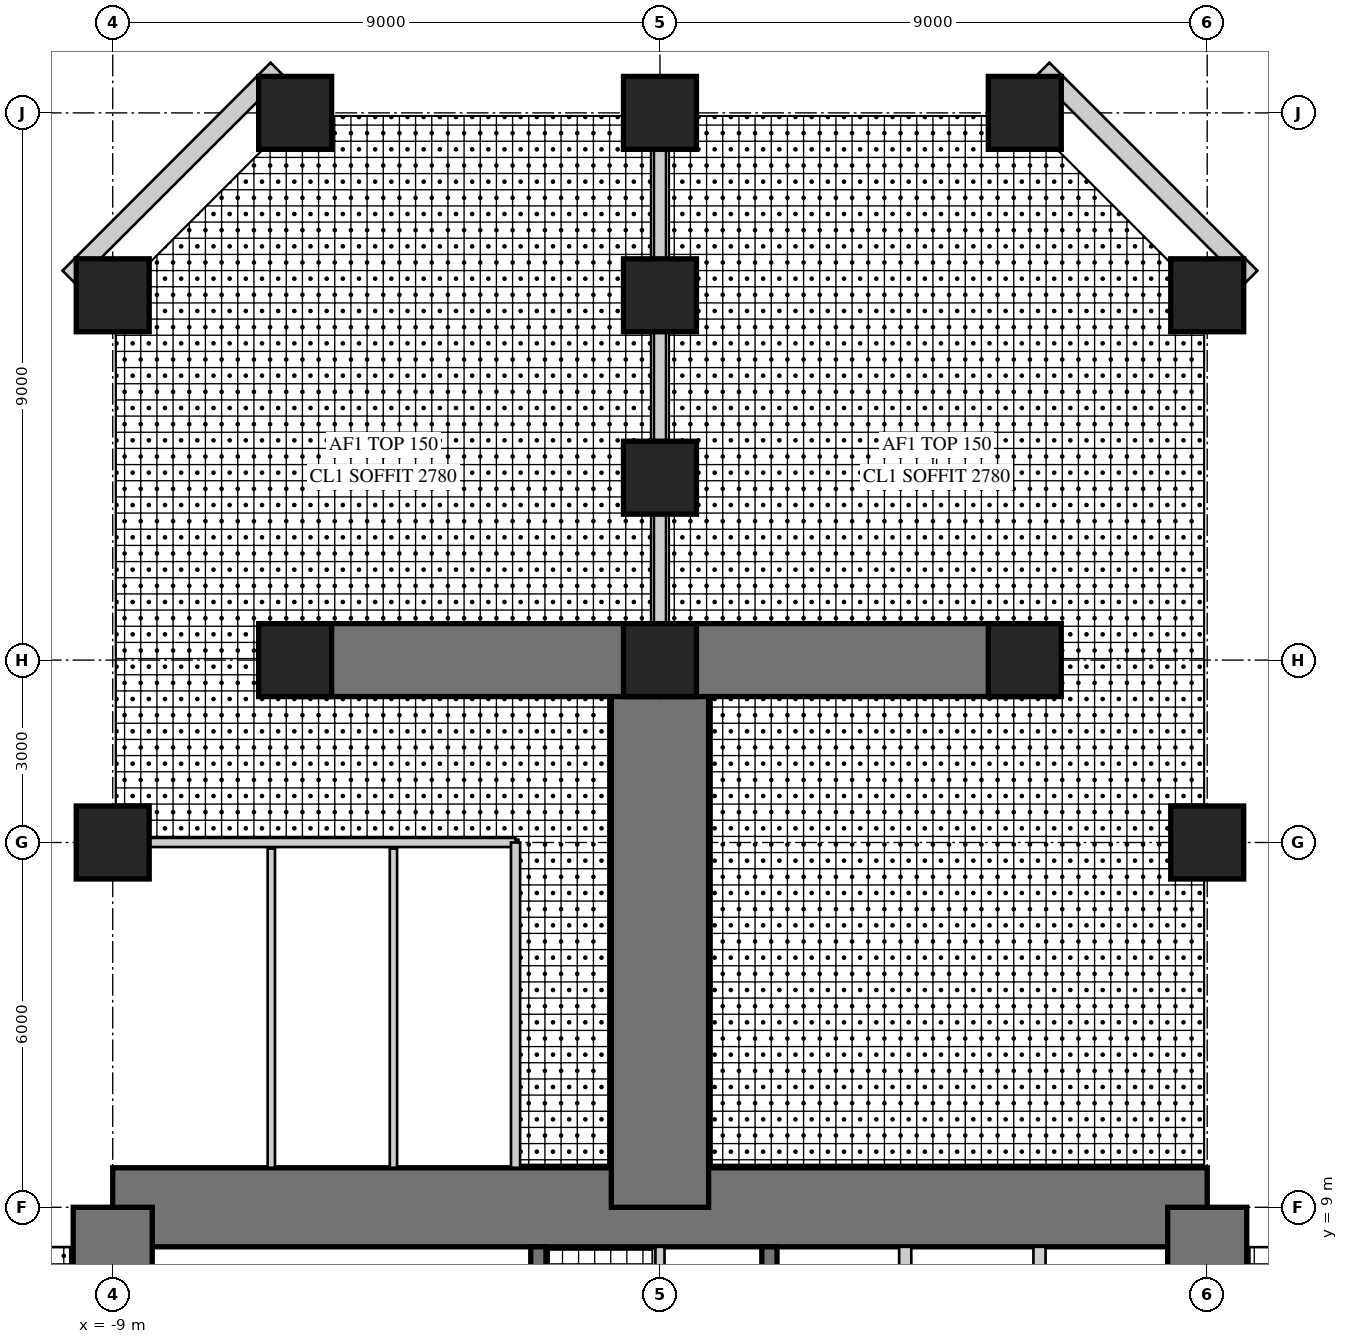
"""IFC4 building model, lengths in metres.
Left out: names, types, materials, properties, quantities, classifications, styles, units other than length and angle.
Written with IfcOpenShell. Run it as: python <this file> out.ifc"""

import sys

from ifc_helpers import new_model, si_unit, direction, frame, frame_2d, origin, origin_2d, place, context, subcontext, project, spatial, rectangle, hollow_rectangle, extrude, element, fill, save


model = new_model("IFC4")
c1 = context("Model", 3, precision=1e-05, world=origin(), true_north=direction((0.0, 1.0)))
c2 = subcontext(c1, "Body", "Model", "MODEL_VIEW")
j1 = project(units=[si_unit("LENGTHUNIT", "METRE"), si_unit("PLANEANGLEUNIT", "RADIAN")], contexts=[c1])
p1 = place(None, origin())
s1 = spatial("IfcSite", under=j1, at=p1, CompositionType="ELEMENT")
p2 = place(p1, origin())
s2 = spatial("IfcBuilding", under=s1, at=p2, CompositionType="ELEMENT")
p3 = place(p2, frame((0.0, 0.0, 59.5)))
s3 = spatial("IfcBuildingStorey", under=s2, at=p3, CompositionType="ELEMENT", Elevation=59.5)
p4 = place(p3, frame((9.0, 9.0, 0.0), z_axis=(0.0, 0.0, 1.0), x_axis=(-1.0, 0.0, 0.0)))
e1 = element("IfcWall", 1, at=p4, inside=s3, PredefinedType="SHEAR", context=c2, shape_type="SweptSolid", body=[
    extrude(rectangle(XDim=18.0, YDim=1.3, at=frame_2d((9.0, 0.0))), origin(), (0.0, 0.0, 1.0), 4.0),
])
p5 = place(p4, frame((9.8, 0.0, 0.0)))
e2 = element("IfcOpeningElement", 2, at=p5, cuts=e1, PredefinedType="OPENING", context=c2, shape_type="SweptSolid", body=[
    extrude(rectangle(XDim=1.0, YDim=2.4, at=frame_2d((0.5, 1.2))), frame((0.0, 0.66, 0.0), z_axis=(0.0, -1.0, 0.0), x_axis=(1.0, 0.0, 0.0)), (0.0, 0.0, 1.0), 1.32),
])
p6 = place(p3, frame((9.0, -9.0, 0.0), z_axis=(0.0, 0.0, 1.0), x_axis=(0.0, 1.0, 0.0)))
e3 = element("IfcWall", 3, at=p6, inside=s3, PredefinedType="SHEAR", context=c2, shape_type="SweptSolid", body=[
    extrude(rectangle(XDim=18.0, YDim=1.3, at=frame_2d((9.0, 0.0))), origin(), (0.0, 0.0, 1.0), 4.0),
])
p7 = place(p6, frame((9.8, 0.0, 0.0)))
e4 = element("IfcOpeningElement", 4, at=p7, cuts=e3, PredefinedType="OPENING", context=c2, shape_type="SweptSolid", body=[
    extrude(rectangle(XDim=1.0, YDim=2.4, at=frame_2d((0.5, 1.2))), frame((0.0, 0.66, 0.0), z_axis=(0.0, -1.0, 0.0), x_axis=(1.0, 0.0, 0.0)), (0.0, 0.0, 1.0), 1.32),
])
p8 = place(p3, frame((-9.0, 9.0, 0.0), z_axis=(0.0, 0.0, 1.0), x_axis=(0.0, -1.0, 0.0)))
e5 = element("IfcWall", 5, at=p8, inside=s3, PredefinedType="SHEAR", context=c2, shape_type="SweptSolid", body=[
    extrude(rectangle(XDim=18.0, YDim=1.3, at=frame_2d((9.0, 0.0))), origin(), (0.0, 0.0, 1.0), 4.0),
])
p9 = place(p8, frame((9.8, 0.0, 0.0)))
e6 = element("IfcOpeningElement", 6, at=p9, cuts=e5, PredefinedType="OPENING", context=c2, shape_type="SweptSolid", body=[
    extrude(rectangle(XDim=1.0, YDim=2.4, at=frame_2d((0.5, 1.2))), frame((0.0, 0.66, 0.0), z_axis=(0.0, -1.0, 0.0), x_axis=(1.0, 0.0, 0.0)), (0.0, 0.0, 1.0), 1.32),
])
p10 = place(p3, frame((1.8, 1.875, 0.0), z_axis=(0.0, 0.0, 1.0), x_axis=(0.0, 1.0, 0.0)))
e7 = element("IfcWall", 7, at=p10, inside=s3, PredefinedType="SHEAR", context=c2, shape_type="SweptSolid", body=[
    extrude(rectangle(XDim=6.475, YDim=0.25, at=frame_2d((3.238, 0.0))), origin(), (0.0, 0.0, 1.0), 4.0),
])
p11 = place(p10, frame((1.875, 0.0, 0.0)))
e8 = element("IfcOpeningElement", 8, at=p11, cuts=e7, PredefinedType="OPENING", context=c2, shape_type="SweptSolid", body=[
    extrude(rectangle(XDim=1.6, YDim=2.4, at=frame_2d((0.8, 1.2))), frame((0.0, 0.135, 0.0), z_axis=(0.0, -1.0, 0.0), x_axis=(1.0, 0.0, 0.0)), (0.0, 0.0, 1.0), 0.27),
])
for number, where, z_axis, x_axis in (
    (9, (4.033, 5.975, 0.0), (0.0, 0.0, 1.0), (0.0, 1.0, 0.0)),
    (10, (6.242, 5.975, 0.0), (0.0, 0.0, 1.0), (0.0, 1.0, 0.0)),
):
    element("IfcWall", number, at=place(p3, frame(where, z_axis=z_axis, x_axis=x_axis)), inside=s3, PredefinedType="PARTITIONING", context=c2, shape_type="SweptSolid", body=[
        extrude(rectangle(XDim=2.375, YDim=0.2, at=frame_2d((1.188, 0.0))), origin(), (0.0, 0.0, 1.0), 4.0),
    ])
p12 = place(p3, frame((-2.0, 1.675, 0.0), z_axis=(0.0, 0.0, 1.0), x_axis=(0.0, 1.0, 0.0)))
e11 = element("IfcWall", 11, at=p12, inside=s3, PredefinedType="SHEAR", context=c2, shape_type="SweptSolid", body=[
    extrude(rectangle(XDim=6.675, YDim=0.25, at=frame_2d((3.337, 0.0))), origin(), (0.0, 0.0, 1.0), 4.0),
])
p13 = place(p12, frame((0.725, 0.0, 0.0)))
e12 = element("IfcOpeningElement", 12, at=p13, cuts=e11, PredefinedType="OPENING", context=c2, shape_type="SweptSolid", body=[
    extrude(rectangle(XDim=1.0, YDim=2.1, at=frame_2d((0.5, 1.05))), frame((0.0, 0.135, 0.0), z_axis=(0.0, -1.0, 0.0), x_axis=(1.0, 0.0, 0.0)), (0.0, 0.0, 1.0), 0.27),
])
p14 = place(p3, frame((0.0, 9.0, 0.0), z_axis=(0.0, 0.0, 1.0), x_axis=(0.0, 1.0, 0.0)))
e13 = element("IfcWall", 13, at=p14, inside=s3, PredefinedType="SHEAR", context=c2, shape_type="SweptSolid", body=[
    extrude(rectangle(XDim=9.0, YDim=1.6, at=frame_2d((4.5, 0.0))), origin(), (0.0, 0.0, 1.0), 4.0),
])
for number, where, z_axis, x_axis in (
    (14, (0.0, 18.0, 0.0), (0.0, 0.0, 1.0), (-1.0, 0.0, 0.0)),
    (15, (0.0, 18.0, 0.0), (0.0, 0.0, 1.0), (1.0, 0.0, 0.0)),
):
    element("IfcWall", number, at=place(p3, frame(where, z_axis=z_axis, x_axis=x_axis)), inside=s3, PredefinedType="SHEAR", context=c2, shape_type="SweptSolid", body=[
        extrude(rectangle(XDim=6.0, YDim=1.2, at=frame_2d((3.0, 0.0))), origin(), (0.0, 0.0, 1.0), 4.0),
    ])
for number, where, z_axis, x_axis in (
    (16, (9.0, 15.0, 0.0), (0.0, 0.0, 1.0), (1.0, 0.0, 0.0)),
    (17, (9.0, 24.0, 0.0), (0.0, 0.0, 1.0), (1.0, 0.0, 0.0)),
    (18, (-9.0, 15.0, 0.0), (0.0, 0.0, 1.0), (1.0, 0.0, 0.0)),
    (19, (-9.0, 24.0, 0.0), (0.0, 0.0, 1.0), (1.0, 0.0, 0.0)),
    (20, (6.0, 27.0, 0.0), (0.0, 0.0, 1.0), (1.0, 0.0, 0.0)),
    (21, (0.0, 27.0, 0.0), (0.0, 0.0, 1.0), (1.0, 0.0, 0.0)),
    (22, (-6.0, 27.0, 0.0), (0.0, 0.0, 1.0), (1.0, 0.0, 0.0)),
    (23, (6.0, 18.0, 0.0), (0.0, 0.0, 1.0), (1.0, 0.0, 0.0)),
    (24, (0.0, 18.0, 0.0), (0.0, 0.0, 1.0), (1.0, 0.0, 0.0)),
    (25, (-6.0, 18.0, 0.0), (0.0, 0.0, 1.0), (1.0, 0.0, 0.0)),
    (26, (0.0, 21.0, 0.0), (0.0, 0.0, 1.0), (1.0, 0.0, 0.0)),
    (27, (0.0, 24.0, 0.0), (0.0, 0.0, 1.0), (1.0, 0.0, 0.0)),
):
    element("IfcColumn", number, at=place(p3, frame(where, z_axis=z_axis, x_axis=x_axis)), inside=s3, PredefinedType="COLUMN", context=c2, shape_type="SweptSolid", body=[
        extrude(rectangle(XDim=1.2, YDim=1.2, at=origin_2d()), origin(), (0.0, 0.0, 1.0), 4.0),
    ])
p15 = place(p3, frame((9.72, 24.298, 0.0), z_axis=(0.0, 0.0, 1.0), x_axis=(-0.707106781187, 0.707106781187, 0.0)))
e28 = element("IfcWall", 28, at=p15, inside=s3, PredefinedType="SOLIDWALL", context=c2, shape_type="SweptSolid", body=[
    extrude(rectangle(XDim=4.839, YDim=0.3, at=frame_2d((2.419, 0.0))), origin(), (0.0, 0.0, 1.0), 3.8),
])
p16 = place(p15, frame((1.969, 0.0, 0.3)))
e29 = element("IfcOpeningElement", 29, at=p16, cuts=e28, PredefinedType="OPENING", context=c2, shape_type="SweptSolid", body=[
    extrude(rectangle(XDim=0.9, YDim=2.4, at=frame_2d((0.45, 1.2))), frame((0.0, 0.16, 0.0), z_axis=(0.0, -1.0, 0.0), x_axis=(1.0, 0.0, 0.0)), (0.0, 0.0, 1.0), 0.32),
])
p17 = place(p3, frame((-6.298, 27.72, 0.0), z_axis=(0.0, 0.0, 1.0), x_axis=(-0.707106781187, -0.707106781187, 0.0)))
e30 = element("IfcWall", 30, at=p17, inside=s3, PredefinedType="SOLIDWALL", context=c2, shape_type="SweptSolid", body=[
    extrude(rectangle(XDim=4.839, YDim=0.3, at=frame_2d((2.419, 0.0))), origin(), (0.0, 0.0, 1.0), 3.8),
])
p18 = place(p17, frame((1.969, 0.0, 0.3)))
e31 = element("IfcOpeningElement", 31, at=p18, cuts=e30, PredefinedType="OPENING", context=c2, shape_type="SweptSolid", body=[
    extrude(rectangle(XDim=0.9, YDim=2.4, at=frame_2d((0.45, 1.2))), frame((0.0, 0.16, 0.0), z_axis=(0.0, -1.0, 0.0), x_axis=(1.0, 0.0, 0.0)), (0.0, 0.0, 1.0), 0.32),
])
p19 = place(p3, frame((0.0, 5.675, 0.0), z_axis=(0.0, 0.0, 1.0), x_axis=(0.0, 1.0, 0.0)))
e32 = element("IfcWall", 32, at=p19, inside=s3, PredefinedType="PARTITIONING", context=c2, shape_type="SweptSolid", body=[
    extrude(rectangle(XDim=2.675, YDim=0.15, at=frame_2d((1.337, 0.0))), origin(), (0.0, 0.0, 1.0), 3.8),
])
p20 = place(p19, frame((0.4, 0.0, 0.0)))
e33 = element("IfcOpeningElement", 33, at=p20, cuts=e32, PredefinedType="OPENING", context=c2, shape_type="SweptSolid", body=[
    extrude(rectangle(XDim=1.0, YDim=2.1, at=frame_2d((0.5, 1.05))), frame((0.0, 0.085, 0.0), z_axis=(0.0, -1.0, 0.0), x_axis=(1.0, 0.0, 0.0)), (0.0, 0.0, 1.0), 0.17),
])
p21 = place(p3, frame((-2.375, 15.0, 0.0), z_axis=(0.0, 0.0, 1.0), x_axis=(-1.0, 0.0, 0.0)))
e34 = element("IfcWall", 34, at=p21, inside=s3, PredefinedType="PARTITIONING", context=c2, shape_type="SweptSolid", body=[
    extrude(rectangle(XDim=6.025, YDim=0.15, at=frame_2d((3.012, 0.0))), origin(), (0.0, 0.0, 1.0), 2.95),
])
p22 = place(p21, frame((0.504, 0.0, 0.0)))
e35 = element("IfcOpeningElement", 35, at=p22, cuts=e34, PredefinedType="OPENING", context=c2, shape_type="SweptSolid", body=[
    extrude(rectangle(XDim=1.0, YDim=2.1, at=frame_2d((0.5, 1.05))), frame((0.0, 0.085, 0.0), z_axis=(0.0, -1.0, 0.0), x_axis=(1.0, 0.0, 0.0)), (0.0, 0.0, 1.0), 0.17),
])
p23 = place(p21, frame((2.512, 0.0, 0.0)))
e36 = element("IfcOpeningElement", 36, at=p23, cuts=e34, PredefinedType="OPENING", context=c2, shape_type="SweptSolid", body=[
    extrude(rectangle(XDim=1.0, YDim=2.1, at=frame_2d((0.5, 1.05))), frame((0.0, 0.085, 0.0), z_axis=(0.0, -1.0, 0.0), x_axis=(1.0, 0.0, 0.0)), (0.0, 0.0, 1.0), 0.17),
])
p24 = place(p21, frame((4.521, 0.0, 0.0)))
e37 = element("IfcOpeningElement", 37, at=p24, cuts=e34, PredefinedType="OPENING", context=c2, shape_type="SweptSolid", body=[
    extrude(rectangle(XDim=1.0, YDim=2.1, at=frame_2d((0.5, 1.05))), frame((0.0, 0.085, 0.0), z_axis=(0.0, -1.0, 0.0), x_axis=(1.0, 0.0, 0.0)), (0.0, 0.0, 1.0), 0.17),
])
p25 = place(p3, frame((-2.375, 9.65, 0.0), z_axis=(0.0, 0.0, 1.0), x_axis=(0.0, 1.0, 0.0)))
e38 = element("IfcWall", 38, at=p25, inside=s3, PredefinedType="PARTITIONING", context=c2, shape_type="SweptSolid", body=[
    extrude(rectangle(XDim=5.35, YDim=0.15, at=frame_2d((2.675, 0.0))), origin(), (0.0, 0.0, 1.0), 3.8),
])
for number, where, z_axis, x_axis in (
    (39, (-4.383, 9.65, 0.0), (0.0, 0.0, 1.0), (0.0, 1.0, 0.0)),
    (40, (-6.392, 9.65, 0.0), (0.0, 0.0, 1.0), (0.0, 1.0, 0.0)),
):
    element("IfcWall", number, at=place(p3, frame(where, z_axis=z_axis, x_axis=x_axis)), inside=s3, PredefinedType="PLUMBINGWALL", context=c2, shape_type="SweptSolid", body=[
        extrude(rectangle(XDim=5.25, YDim=0.12, at=frame_2d((2.625, 0.0))), origin(), (0.0, 0.0, 1.0), 3.8),
    ])
p26 = place(p3, frame((0.0, 18.0, 0.0), z_axis=(0.0, 0.0, 1.0), x_axis=(0.0, 1.0, 0.0)))
e41 = element("IfcWall", 41, at=p26, inside=s3, PredefinedType="SOLIDWALL", context=c2, shape_type="SweptSolid", body=[
    extrude(rectangle(XDim=3.0, YDim=0.2, at=frame_2d((1.5, 0.0))), origin(), (0.0, 0.0, 1.0), 3.8),
])
p27 = place(p26, frame((0.9, 0.0, 0.0)))
e42 = element("IfcOpeningElement", 42, at=p27, cuts=e41, PredefinedType="OPENING", context=c2, shape_type="SweptSolid", body=[
    extrude(rectangle(XDim=1.0, YDim=2.2, at=frame_2d((0.5, 1.1))), frame((0.0, 0.11, 0.0), z_axis=(0.0, -1.0, 0.0), x_axis=(1.0, 0.0, 0.0)), (0.0, 0.0, 1.0), 0.22),
])
p28 = place(p3, frame((0.0, 21.0, 0.0), z_axis=(0.0, 0.0, 1.0), x_axis=(0.0, 1.0, 0.0)))
e43 = element("IfcWall", 43, at=p28, inside=s3, PredefinedType="SOLIDWALL", context=c2, shape_type="SweptSolid", body=[
    extrude(rectangle(XDim=6.0, YDim=0.2, at=frame_2d((3.0, 0.0))), origin(), (0.0, 0.0, 1.0), 2.9),
])
p29 = place(p16, origin())
e44 = element("IfcWindow", 44, at=p29, inside=s3, PartitioningType="SINGLE_PANEL", PredefinedType="WINDOW", context=c2, shape_type="SweptSolid", body=[
    extrude(hollow_rectangle(XDim=0.9, YDim=2.4, WallThickness=0.06, at=frame_2d((0.45, 1.2))), frame((0.0, 0.03, 0.0), z_axis=(0.0, -1.0, 0.0), x_axis=(1.0, 0.0, 0.0)), (0.0, 0.0, 1.0), 0.06),
    extrude(rectangle(XDim=0.779, YDim=2.279, at=frame_2d((0.45, 1.2))), frame((0.0, 0.03, 0.0), z_axis=(0.0, -1.0, 0.0), x_axis=(1.0, 0.0, 0.0)), (0.0, 0.0, 1.0), 0.06),
])
fill(e29, e44)
p30 = place(p18, origin())
e45 = element("IfcWindow", 45, at=p30, inside=s3, PartitioningType="SINGLE_PANEL", PredefinedType="WINDOW", context=c2, shape_type="SweptSolid", body=[
    extrude(hollow_rectangle(XDim=0.9, YDim=2.4, WallThickness=0.06, at=frame_2d((0.45, 1.2))), frame((0.0, 0.03, 0.0), z_axis=(0.0, -1.0, 0.0), x_axis=(1.0, 0.0, 0.0)), (0.0, 0.0, 1.0), 0.06),
    extrude(rectangle(XDim=0.779, YDim=2.279, at=frame_2d((0.45, 1.2))), frame((0.0, 0.03, 0.0), z_axis=(0.0, -1.0, 0.0), x_axis=(1.0, 0.0, 0.0)), (0.0, 0.0, 1.0), 0.06),
])
fill(e31, e45)
p31 = place(p22, origin())
e46 = element("IfcDoor", 46, at=p31, inside=s3, OperationType="SINGLE_SWING_LEFT", PredefinedType="DOOR", context=c2, shape_type="SweptSolid", body=[
    extrude(rectangle(XDim=1.0, YDim=2.1, at=frame_2d((0.5, 1.05))), frame((0.0, 0.025, 0.0), z_axis=(0.0, -1.0, 0.0), x_axis=(1.0, 0.0, 0.0)), (0.0, 0.0, 1.0), 0.05),
])
fill(e35, e46)
p32 = place(p23, origin())
e47 = element("IfcDoor", 47, at=p32, inside=s3, OperationType="SINGLE_SWING_LEFT", PredefinedType="DOOR", context=c2, shape_type="SweptSolid", body=[
    extrude(rectangle(XDim=1.0, YDim=2.1, at=frame_2d((0.5, 1.05))), frame((0.0, 0.025, 0.0), z_axis=(0.0, -1.0, 0.0), x_axis=(1.0, 0.0, 0.0)), (0.0, 0.0, 1.0), 0.05),
])
fill(e36, e47)
p33 = place(p24, origin())
e48 = element("IfcDoor", 48, at=p33, inside=s3, OperationType="SINGLE_SWING_LEFT", PredefinedType="DOOR", context=c2, shape_type="SweptSolid", body=[
    extrude(rectangle(XDim=1.0, YDim=2.1, at=frame_2d((0.5, 1.05))), frame((0.0, 0.025, 0.0), z_axis=(0.0, -1.0, 0.0), x_axis=(1.0, 0.0, 0.0)), (0.0, 0.0, 1.0), 0.05),
])
fill(e37, e48)
p34 = place(p27, origin())
e49 = element("IfcDoor", 49, at=p34, inside=s3, OperationType="SINGLE_SWING_LEFT", PredefinedType="DOOR", context=c2, shape_type="SweptSolid", body=[
    extrude(rectangle(XDim=1.0, YDim=2.2, at=frame_2d((0.5, 1.1))), frame((0.0, 0.025, 0.0), z_axis=(0.0, -1.0, 0.0), x_axis=(1.0, 0.0, 0.0)), (0.0, 0.0, 1.0), 0.05),
])
fill(e42, e49)
p35 = place(p5, frame((1.0, 0.0, 0.0), z_axis=(0.0, 0.0, 1.0), x_axis=(-1.0, 0.0, 0.0)))
e50 = element("IfcDoor", 50, at=p35, inside=s3, OperationType="SINGLE_SWING_RIGHT", PredefinedType="DOOR", context=c2, shape_type="SweptSolid", body=[
    extrude(rectangle(XDim=1.0, YDim=2.4, at=frame_2d((0.5, 1.2))), frame((0.0, -0.005, 0.0), z_axis=(0.0, -1.0, 0.0), x_axis=(1.0, 0.0, 0.0)), (0.0, 0.0, 1.0), 0.05),
])
fill(e2, e50)
save(model, sys.argv[1])
